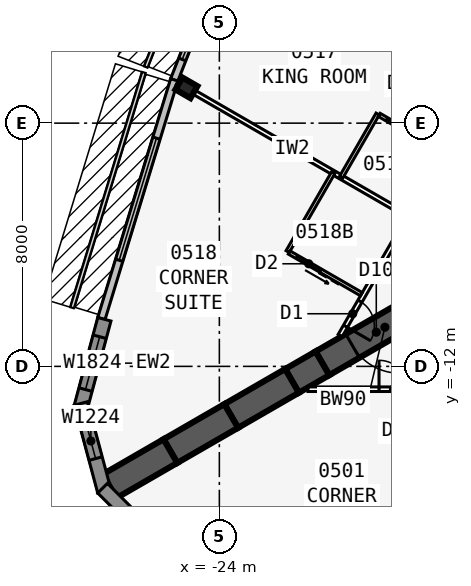
"""IFC4 building model, lengths in metres.
Left out: names, types, materials, properties, quantities, classifications, styles, units other than length and angle.
Written with IfcOpenShell. Run it as: python <this file> out.ifc"""

import sys

from ifc_helpers import new_model, si_unit, direction, frame, frame_2d, origin, origin_2d, place, context, subcontext, project, spatial, polyline, rectangle, i_section, outline, extrude, element, fill, save


model = new_model("IFC4")
c1 = context("Model", 3, precision=1e-05, world=origin(), true_north=direction((0.0, 1.0)))
c2 = subcontext(c1, "Body", "Model", "MODEL_VIEW")
j1 = project(units=[si_unit("LENGTHUNIT", "METRE"), si_unit("PLANEANGLEUNIT", "RADIAN")], contexts=[c1])
p1 = place(None, origin())
s1 = spatial("IfcSite", under=j1, at=p1, CompositionType="ELEMENT")
p2 = place(p1, origin())
s2 = spatial("IfcBuilding", under=s1, at=p2, CompositionType="ELEMENT")
p3 = place(p2, frame((0.0, 0.0, 28.5)))
s3 = spatial("IfcBuildingStorey", under=s2, at=p3, CompositionType="ELEMENT", Elevation=28.5)
p4 = place(p3, frame((-16.5, -9.526, 0.0), z_axis=(0.0, 0.0, 1.0), x_axis=(-0.866031398331, -0.499989616998, 0.0)))
e1 = element("IfcWall", 1, at=p4, inside=s3, PredefinedType="SHEAR", context=c2, shape_type="SweptSolid", body=[
    extrude(rectangle(XDim=4.746, YDim=0.9, at=frame_2d((2.373, 0.0))), origin(), (0.0, 0.0, 1.0), 3.4),
])
p5 = place(p4, frame((1.8, 0.0, 0.0)))
e2 = element("IfcOpeningElement", 2, at=p5, cuts=e1, PredefinedType="OPENING", context=c2, shape_type="SweptSolid", body=[
    extrude(rectangle(XDim=1.8, YDim=2.13, at=frame_2d((0.9, 1.065))), frame((0.0, 0.46, 0.0), z_axis=(0.0, -1.0, 0.0), x_axis=(1.0, 0.0, 0.0)), (0.0, 0.0, 1.0), 0.92),
])
p6 = place(p3, frame((-20.61, -11.899, 0.0), z_axis=(0.0, 0.0, 1.0), x_axis=(-0.866009537788, -0.500027479704, 0.0)))
e3 = element("IfcWall", 3, at=p6, inside=s3, PredefinedType="SHEAR", context=c2, shape_type="SweptSolid", body=[
    extrude(rectangle(XDim=1.155, YDim=0.9, at=frame_2d((0.577, 0.0))), origin(), (0.0, 0.0, 1.0), 3.4),
])
for number, where, z_axis, x_axis in (
    (4, (-21.61, -12.477, 0.0), (0.0, 0.0, 1.0), (-0.866, -0.5, 0.0)),
    (5, (-23.61, -13.631, 0.0), (0.0, 0.0, 1.0), (-0.866, -0.5, 0.0)),
    (6, (-25.61, -14.786, 0.0), (0.0, 0.0, 1.0), (-0.866, -0.5, 0.0)),
):
    element("IfcWall", number, at=place(p3, frame(where, z_axis=z_axis, x_axis=x_axis)), inside=s3, PredefinedType="SHEAR", context=c2, shape_type="SweptSolid", body=[
        extrude(rectangle(XDim=2.309, YDim=0.9, at=frame_2d((1.155, 0.0))), origin(), (0.0, 0.0, 1.0), 3.4),
    ])
p7 = place(p3, frame((-25.083, -2.839, 0.0), z_axis=(0.0, 0.0, 1.0), x_axis=(-0.5, -0.866025403784, 0.0)))
e7 = element("IfcColumn", 7, at=p7, inside=s3, PredefinedType="COLUMN", context=c2, shape_type="SweptSolid", body=[
    extrude(i_section(OverallWidth=0.455, OverallDepth=0.569, WebThickness=0.078, FlangeThickness=0.125, at=origin_2d()), origin(), (0.0, 0.0, 1.0), 3.4),
])
p8 = place(p3, frame((-23.645, 2.126, 0.0), z_axis=(0.0, 0.0, 1.0), x_axis=(-0.364013463868, -0.931393685894, 0.0)))
e8 = element("IfcWall", 8, at=p8, inside=s3, PredefinedType="STANDARD", context=c2, shape_type="SweptSolid", body=[
    extrude(rectangle(XDim=5.058, YDim=0.25, at=frame_2d((2.529, 0.0))), origin(), (0.0, 0.0, 1.0), 3.235),
])
p9 = place(p8, frame((0.729, 0.0, 0.45)))
e9 = element("IfcOpeningElement", 9, at=p9, cuts=e8, PredefinedType="OPENING", context=c2, shape_type="SweptSolid", body=[
    extrude(rectangle(XDim=3.6, YDim=2.4, at=frame_2d((1.8, 1.2))), frame((0.0, 0.135, 0.0), z_axis=(0.0, -1.0, 0.0), x_axis=(1.0, 0.0, 0.0)), (0.0, 0.0, 1.0), 0.27),
])
p10 = place(p3, frame((-25.483, -2.575, 0.0), z_axis=(0.0, 0.0, 1.0), x_axis=(-0.2919790669, -0.956424709265, 0.0)))
e10 = element("IfcWall", 10, at=p10, inside=s3, PredefinedType="STANDARD", context=c2, shape_type="SweptSolid", body=[
    extrude(rectangle(XDim=8.211, YDim=0.25, at=frame_2d((4.105, 0.0))), origin(), (0.0, 0.0, 1.0), 3.235),
])
p11 = place(p10, frame((2.006, 0.0, 0.45)))
e11 = element("IfcOpeningElement", 11, at=p11, cuts=e10, PredefinedType="OPENING", context=c2, shape_type="SweptSolid", body=[
    extrude(rectangle(XDim=4.2, YDim=2.4, at=frame_2d((2.1, 1.2))), frame((0.0, 0.135, 0.0), z_axis=(0.0, -1.0, 0.0), x_axis=(1.0, 0.0, 0.0)), (0.0, 0.0, 1.0), 0.27),
])
p12 = place(p3, frame((-27.783, -10.45, 0.0), z_axis=(0.0, 0.0, 1.0), x_axis=(-0.258780998834, -0.965936019953, 0.0)))
e12 = element("IfcWall", 12, at=p12, inside=s3, PredefinedType="SOLIDWALL", context=c2, shape_type="SweptSolid", body=[
    extrude(rectangle(XDim=2.989, YDim=0.45, at=frame_2d((1.494, 0.0))), origin(), (0.0, 0.0, 1.0), 3.235),
])
p13 = place(p12, frame((0.594, 0.0, 0.45)))
e13 = element("IfcOpeningElement", 13, at=p13, cuts=e12, PredefinedType="OPENING", context=c2, shape_type="SweptSolid", body=[
    extrude(rectangle(XDim=1.8, YDim=2.4, at=frame_2d((0.9, 1.2))), frame((0.0, 0.235, 0.0), z_axis=(0.0, -1.0, 0.0), x_axis=(1.0, 0.0, 0.0)), (0.0, 0.0, 1.0), 0.47),
])
p14 = place(p3, frame((-28.556, -13.221, 0.0), z_axis=(0.0, 0.0, 1.0), x_axis=(0.258801419081, -0.965930548995, 0.0)))
e14 = element("IfcWall", 14, at=p14, inside=s3, PredefinedType="SOLIDWALL", context=c2, shape_type="SweptSolid", body=[
    extrude(outline(polyline([(2.989, 0.225), (2.929, 0.225), (2.437, 0.093), (2.402, 0.225), (0.0, 0.225), (0.0, -0.225), (2.989, -0.225), (2.989, 0.225)])), origin(), (0.0, 0.0, 1.0), 3.235),
])
p15 = place(p14, frame((0.676, 0.0, 0.45)))
e15 = element("IfcOpeningElement", 15, at=p15, cuts=e14, PredefinedType="OPENING", context=c2, shape_type="SweptSolid", body=[
    extrude(rectangle(XDim=1.2, YDim=2.4, at=frame_2d((0.6, 1.2))), frame((0.0, 0.235, 0.0), z_axis=(0.0, -1.0, 0.0), x_axis=(1.0, 0.0, 0.0)), (0.0, 0.0, 1.0), 0.47),
])
p16 = place(p3, frame((-27.841, -16.007, 0.0), z_axis=(0.0, 0.0, 1.0), x_axis=(0.707025086683, -0.707188466253, 0.0)))
e16 = element("IfcWall", 16, at=p16, inside=s3, PredefinedType="SOLIDWALL", context=c2, shape_type="SweptSolid", body=[
    extrude(outline(polyline([(2.989, 0.225), (0.586, 0.225), (0.551, 0.093), (0.059, 0.225), (0.0, 0.225), (0.0, -0.225), (2.989, -0.225), (2.989, 0.225)])), origin(), (0.0, 0.0, 1.0), 3.235),
])
p17 = place(p16, frame((1.113, 0.0, 0.45)))
e17 = element("IfcOpeningElement", 17, at=p17, cuts=e16, PredefinedType="OPENING", context=c2, shape_type="SweptSolid", body=[
    extrude(rectangle(XDim=1.2, YDim=2.4, at=frame_2d((0.6, 1.2))), frame((0.0, 0.235, 0.0), z_axis=(0.0, -1.0, 0.0), x_axis=(1.0, 0.0, 0.0)), (0.0, 0.0, 1.0), 0.47),
])
p18 = place(p3, frame((-21.086, -12.751, 0.0), z_axis=(0.0, 0.0, 1.0), x_axis=(1.0, 0.0, 0.0)))
e18 = element("IfcWall", 18, at=p18, inside=s3, PredefinedType="PARTITIONING", context=c2, shape_type="SweptSolid", body=[
    extrude(rectangle(XDim=42.172, YDim=0.15, at=frame_2d((21.086, 0.0))), origin(), (0.0, 0.0, 1.0), 3.235),
])
p19 = place(p18, frame((2.338, 0.0, 0.0)))
e19 = element("IfcOpeningElement", 19, at=p19, cuts=e18, PredefinedType="OPENING", context=c2, shape_type="SweptSolid", body=[
    extrude(rectangle(XDim=0.95, YDim=2.13, at=frame_2d((0.475, 1.065))), frame((0.0, 0.085, 0.0), z_axis=(0.0, -1.0, 0.0), x_axis=(1.0, 0.0, 0.0)), (0.0, 0.0, 1.0), 0.17),
])
p20 = place(p18, frame((12.511, 0.0, 0.0)))
e20 = element("IfcOpeningElement", 20, at=p20, cuts=e18, PredefinedType="OPENING", context=c2, shape_type="SweptSolid", body=[
    extrude(rectangle(XDim=0.95, YDim=2.13, at=frame_2d((0.475, 1.065))), frame((0.0, 0.085, 0.0), z_axis=(0.0, -1.0, 0.0), x_axis=(1.0, 0.0, 0.0)), (0.0, 0.0, 1.0), 0.17),
])
p21 = place(p18, frame((18.711, 0.0, 0.0)))
e21 = element("IfcOpeningElement", 21, at=p21, cuts=e18, PredefinedType="OPENING", context=c2, shape_type="SweptSolid", body=[
    extrude(rectangle(XDim=0.95, YDim=2.13, at=frame_2d((0.475, 1.065))), frame((0.0, 0.085, 0.0), z_axis=(0.0, -1.0, 0.0), x_axis=(1.0, 0.0, 0.0)), (0.0, 0.0, 1.0), 0.17),
])
p22 = place(p18, frame((23.086, 0.0, 0.0)))
e22 = element("IfcOpeningElement", 22, at=p22, cuts=e18, PredefinedType="OPENING", context=c2, shape_type="SweptSolid", body=[
    extrude(rectangle(XDim=1.0, YDim=2.13, at=frame_2d((0.5, 1.065))), frame((0.0, 0.085, 0.0), z_axis=(0.0, -1.0, 0.0), x_axis=(1.0, 0.0, 0.0)), (0.0, 0.0, 1.0), 0.17),
])
p23 = place(p18, frame((27.511, 0.0, 0.0)))
e23 = element("IfcOpeningElement", 23, at=p23, cuts=e18, PredefinedType="OPENING", context=c2, shape_type="SweptSolid", body=[
    extrude(rectangle(XDim=0.95, YDim=2.13, at=frame_2d((0.475, 1.065))), frame((0.0, 0.085, 0.0), z_axis=(0.0, -1.0, 0.0), x_axis=(1.0, 0.0, 0.0)), (0.0, 0.0, 1.0), 0.17),
])
p24 = place(p18, frame((34.311, 0.0, 0.0)))
e24 = element("IfcOpeningElement", 24, at=p24, cuts=e18, PredefinedType="OPENING", context=c2, shape_type="SweptSolid", body=[
    extrude(rectangle(XDim=0.95, YDim=2.13, at=frame_2d((0.475, 1.065))), frame((0.0, 0.085, 0.0), z_axis=(0.0, -1.0, 0.0), x_axis=(1.0, 0.0, 0.0)), (0.0, 0.0, 1.0), 0.17),
])
p25 = place(p18, frame((39.311, 0.0, 0.0)))
e25 = element("IfcOpeningElement", 25, at=p25, cuts=e18, PredefinedType="OPENING", context=c2, shape_type="SweptSolid", body=[
    extrude(rectangle(XDim=0.95, YDim=2.13, at=frame_2d((0.475, 1.065))), frame((0.0, 0.085, 0.0), z_axis=(0.0, -1.0, 0.0), x_axis=(1.0, 0.0, 0.0)), (0.0, 0.0, 1.0), 0.17),
])
p26 = place(p3, frame((-0.5, 22.836, 0.0), z_axis=(0.0, 0.0, 1.0), x_axis=(-0.500001677587, -0.866024435227, 0.0)))
e26 = element("IfcWall", 26, at=p26, inside=s3, PredefinedType="PARTITIONING", context=c2, shape_type="SweptSolid", body=[
    extrude(rectangle(XDim=39.054, YDim=0.15, at=frame_2d((19.527, 0.0))), origin(), (0.0, 0.0, 1.0), 3.235),
])
p27 = place(p26, frame((1.558, 0.0, 0.0)))
e27 = element("IfcOpeningElement", 27, at=p27, cuts=e26, PredefinedType="OPENING", context=c2, shape_type="SweptSolid", body=[
    extrude(rectangle(XDim=0.95, YDim=2.13, at=frame_2d((0.475, 1.065))), frame((0.0, 0.085, 0.0), z_axis=(0.0, -1.0, 0.0), x_axis=(1.0, 0.0, 0.0)), (0.0, 0.0, 1.0), 0.17),
])
p28 = place(p26, frame((15.352, 0.0, 0.0)))
e28 = element("IfcOpeningElement", 28, at=p28, cuts=e26, PredefinedType="OPENING", context=c2, shape_type="SweptSolid", body=[
    extrude(rectangle(XDim=0.95, YDim=2.13, at=frame_2d((0.475, 1.065))), frame((0.0, 0.085, 0.0), z_axis=(0.0, -1.0, 0.0), x_axis=(1.0, 0.0, 0.0)), (0.0, 0.0, 1.0), 0.17),
])
p29 = place(p26, frame((22.752, 0.0, 0.0)))
e29 = element("IfcOpeningElement", 29, at=p29, cuts=e26, PredefinedType="OPENING", context=c2, shape_type="SweptSolid", body=[
    extrude(rectangle(XDim=0.95, YDim=2.13, at=frame_2d((0.475, 1.065))), frame((0.0, 0.085, 0.0), z_axis=(0.0, -1.0, 0.0), x_axis=(1.0, 0.0, 0.0)), (0.0, 0.0, 1.0), 0.17),
])
p30 = place(p26, frame((30.952, 0.0, 0.0)))
e30 = element("IfcOpeningElement", 30, at=p30, cuts=e26, PredefinedType="OPENING", context=c2, shape_type="SweptSolid", body=[
    extrude(rectangle(XDim=0.95, YDim=2.13, at=frame_2d((0.475, 1.065))), frame((0.0, 0.085, 0.0), z_axis=(0.0, -1.0, 0.0), x_axis=(1.0, 0.0, 0.0)), (0.0, 0.0, 1.0), 0.17),
])
p31 = place(p26, frame((37.752, 0.0, 0.0)))
e31 = element("IfcOpeningElement", 31, at=p31, cuts=e26, PredefinedType="OPENING", context=c2, shape_type="SweptSolid", body=[
    extrude(rectangle(XDim=0.95, YDim=2.13, at=frame_2d((0.475, 1.065))), frame((0.0, 0.085, 0.0), z_axis=(0.0, -1.0, 0.0), x_axis=(1.0, 0.0, 0.0)), (0.0, 0.0, 1.0), 0.17),
])
p32 = place(p3, frame((-15.329, -2.697, 0.0), z_axis=(0.0, 0.0, 1.0), x_axis=(-0.866018409083, 0.500012114982, 0.0)))
e32 = element("IfcWall", 32, at=p32, inside=s3, PredefinedType="PARTITIONING", context=c2, shape_type="SweptSolid", body=[
    extrude(rectangle(XDim=9.485, YDim=0.15, at=frame_2d((4.742, 0.0))), origin(), (0.0, 0.0, 1.0), 2.389),
])
p33 = place(p3, frame((-17.829, -7.027, 0.0), z_axis=(0.0, 0.0, 1.0), x_axis=(-0.866032659912, 0.499987431809, 0.0)))
e33 = element("IfcWall", 33, at=p33, inside=s3, PredefinedType="PARTITIONING", context=c2, shape_type="SweptSolid", body=[
    extrude(rectangle(XDim=8.72, YDim=0.15, at=frame_2d((4.36, 0.0))), origin(), (0.0, 0.0, 1.0), 2.389),
])
p34 = place(p3, frame((-18.793, -3.699, 0.0), z_axis=(0.0, 0.0, 1.0), x_axis=(-0.500001309137, -0.866024647952, 0.0)))
e34 = element("IfcWall", 34, at=p34, inside=s3, PredefinedType="PLUMBINGWALL", context=c2, shape_type="SweptSolid", body=[
    extrude(rectangle(XDim=2.4, YDim=0.12, at=frame_2d((1.2, 0.0))), origin(), (0.0, 0.0, 1.0), 3.235),
])
p35 = place(p3, frame((-16.628, -4.949, 0.0), z_axis=(0.0, 0.0, 1.0), x_axis=(-0.866048967903, 0.499959183527, 0.0)))
e35 = element("IfcWall", 35, at=p35, inside=s3, PredefinedType="PLUMBINGWALL", context=c2, shape_type="SweptSolid", body=[
    extrude(rectangle(XDim=2.44, YDim=0.12, at=frame_2d((1.22, 0.0))), origin(), (0.0, 0.0, 1.0), 3.235),
])
p36 = place(p35, frame((1.25, 0.0, 0.0)))
e36 = element("IfcOpeningElement", 36, at=p36, cuts=e35, PredefinedType="OPENING", context=c2, shape_type="SweptSolid", body=[
    extrude(rectangle(XDim=0.9, YDim=2.13, at=frame_2d((0.45, 1.065))), frame((0.0, 0.07, 0.0), z_axis=(0.0, -1.0, 0.0), x_axis=(1.0, 0.0, 0.0)), (0.0, 0.0, 1.0), 0.14),
])
p37 = place(p3, frame((-20.253, -5.627, 0.0), z_axis=(0.0, 0.0, 1.0), x_axis=(-0.499990139034, -0.866031096941, 0.0)))
e37 = element("IfcWall", 37, at=p37, inside=s3, PredefinedType="PLUMBINGWALL", context=c2, shape_type="SweptSolid", body=[
    extrude(rectangle(XDim=3.0, YDim=0.12, at=frame_2d((1.5, 0.0))), origin(), (0.0, 0.0, 1.0), 3.235),
])
p38 = place(p3, frame((-19.329, -9.625, 0.0), z_axis=(0.0, 0.0, 1.0), x_axis=(-0.866035715982, 0.499982138324, 0.0)))
e38 = element("IfcWall", 38, at=p38, inside=s3, PredefinedType="PLUMBINGWALL", context=c2, shape_type="SweptSolid", body=[
    extrude(rectangle(XDim=2.74, YDim=0.12, at=frame_2d((1.37, 0.0))), origin(), (0.0, 0.0, 1.0), 3.235),
])
p39 = place(p38, frame((1.55, 0.0, 0.0)))
e39 = element("IfcOpeningElement", 39, at=p39, cuts=e38, PredefinedType="OPENING", context=c2, shape_type="SweptSolid", body=[
    extrude(rectangle(XDim=0.9, YDim=2.13, at=frame_2d((0.45, 1.065))), frame((0.0, 0.07, 0.0), z_axis=(0.0, -1.0, 0.0), x_axis=(1.0, 0.0, 0.0)), (0.0, 0.0, 1.0), 0.14),
])
p40 = place(p9, origin())
e40 = element("IfcWindow", 40, at=p40, inside=s3, PartitioningType="SINGLE_PANEL", PredefinedType="WINDOW", context=c2, shape_type="SweptSolid", body=[
    extrude(rectangle(XDim=3.6, YDim=2.4, at=frame_2d((1.8, 1.2))), frame((0.0, 0.03, 0.0), z_axis=(0.0, -1.0, 0.0), x_axis=(1.0, 0.0, 0.0)), (0.0, 0.0, 1.0), 0.06),
])
fill(e9, e40)
p41 = place(p11, origin())
e41 = element("IfcWindow", 41, at=p41, inside=s3, PartitioningType="SINGLE_PANEL", PredefinedType="WINDOW", context=c2, shape_type="SweptSolid", body=[
    extrude(rectangle(XDim=4.2, YDim=2.4, at=frame_2d((2.1, 1.2))), frame((0.0, 0.03, 0.0), z_axis=(0.0, -1.0, 0.0), x_axis=(1.0, 0.0, 0.0)), (0.0, 0.0, 1.0), 0.06),
])
fill(e11, e41)
p42 = place(p13, origin())
e42 = element("IfcWindow", 42, at=p42, inside=s3, PartitioningType="SINGLE_PANEL", PredefinedType="WINDOW", context=c2, shape_type="SweptSolid", body=[
    extrude(rectangle(XDim=1.8, YDim=2.4, at=frame_2d((0.9, 1.2))), frame((0.0, 0.03, 0.0), z_axis=(0.0, -1.0, 0.0), x_axis=(1.0, 0.0, 0.0)), (0.0, 0.0, 1.0), 0.06),
])
fill(e13, e42)
p43 = place(p15, origin())
e43 = element("IfcWindow", 43, at=p43, inside=s3, PartitioningType="SINGLE_PANEL", PredefinedType="WINDOW", context=c2, shape_type="SweptSolid", body=[
    extrude(rectangle(XDim=1.2, YDim=2.4, at=frame_2d((0.6, 1.2))), frame((0.0, 0.03, 0.0), z_axis=(0.0, -1.0, 0.0), x_axis=(1.0, 0.0, 0.0)), (0.0, 0.0, 1.0), 0.06),
])
fill(e15, e43)
p44 = place(p19, origin())
e44 = element("IfcDoor", 44, at=p44, inside=s3, OperationType="SINGLE_SWING_LEFT", PredefinedType="DOOR", context=c2, shape_type="SweptSolid", body=[
    extrude(rectangle(XDim=0.95, YDim=2.13, at=frame_2d((0.475, 1.065))), frame((0.0, 0.025, 0.0), z_axis=(0.0, -1.0, 0.0), x_axis=(1.0, 0.0, 0.0)), (0.0, 0.0, 1.0), 0.05),
])
fill(e19, e44)
p45 = place(p36, origin())
e45 = element("IfcDoor", 45, at=p45, inside=s3, OperationType="SLIDING_TO_LEFT", PredefinedType="DOOR", context=c2, shape_type="SweptSolid", body=[
    extrude(rectangle(XDim=0.9, YDim=2.13, at=frame_2d((0.45, 1.065))), frame((0.0, 0.025, 0.0), z_axis=(0.0, -1.0, 0.0), x_axis=(1.0, 0.0, 0.0)), (0.0, 0.0, 1.0), 0.05),
])
fill(e36, e45)
p46 = place(p39, origin())
e46 = element("IfcDoor", 46, at=p46, inside=s3, OperationType="SLIDING_TO_LEFT", PredefinedType="DOOR", context=c2, shape_type="SweptSolid", body=[
    extrude(rectangle(XDim=0.9, YDim=2.13, at=frame_2d((0.45, 1.065))), frame((0.0, 0.025, 0.0), z_axis=(0.0, -1.0, 0.0), x_axis=(1.0, 0.0, 0.0)), (0.0, 0.0, 1.0), 0.05),
])
fill(e39, e46)
p47 = place(p31, origin())
e47 = element("IfcDoor", 47, at=p47, inside=s3, OperationType="SINGLE_SWING_RIGHT", PredefinedType="DOOR", context=c2, shape_type="SweptSolid", body=[
    extrude(rectangle(XDim=0.95, YDim=2.13, at=frame_2d((0.475, 1.065))), frame((0.0, 0.025, 0.0), z_axis=(0.0, -1.0, 0.0), x_axis=(1.0, 0.0, 0.0)), (0.0, 0.0, 1.0), 0.05),
])
fill(e31, e47)
p48 = place(p5, origin())
e48 = element("IfcDoor", 48, at=p48, inside=s3, OperationType="DOUBLE_DOOR_DOUBLE_SWING", PredefinedType="DOOR", context=c2, shape_type="SweptSolid", body=[
    extrude(rectangle(XDim=1.8, YDim=2.13, at=frame_2d((0.9, 1.065))), frame((0.0, 0.025, 0.0), z_axis=(0.0, -1.0, 0.0), x_axis=(1.0, 0.0, 0.0)), (0.0, 0.0, 1.0), 0.05),
])
fill(e2, e48)
save(model, sys.argv[1])
